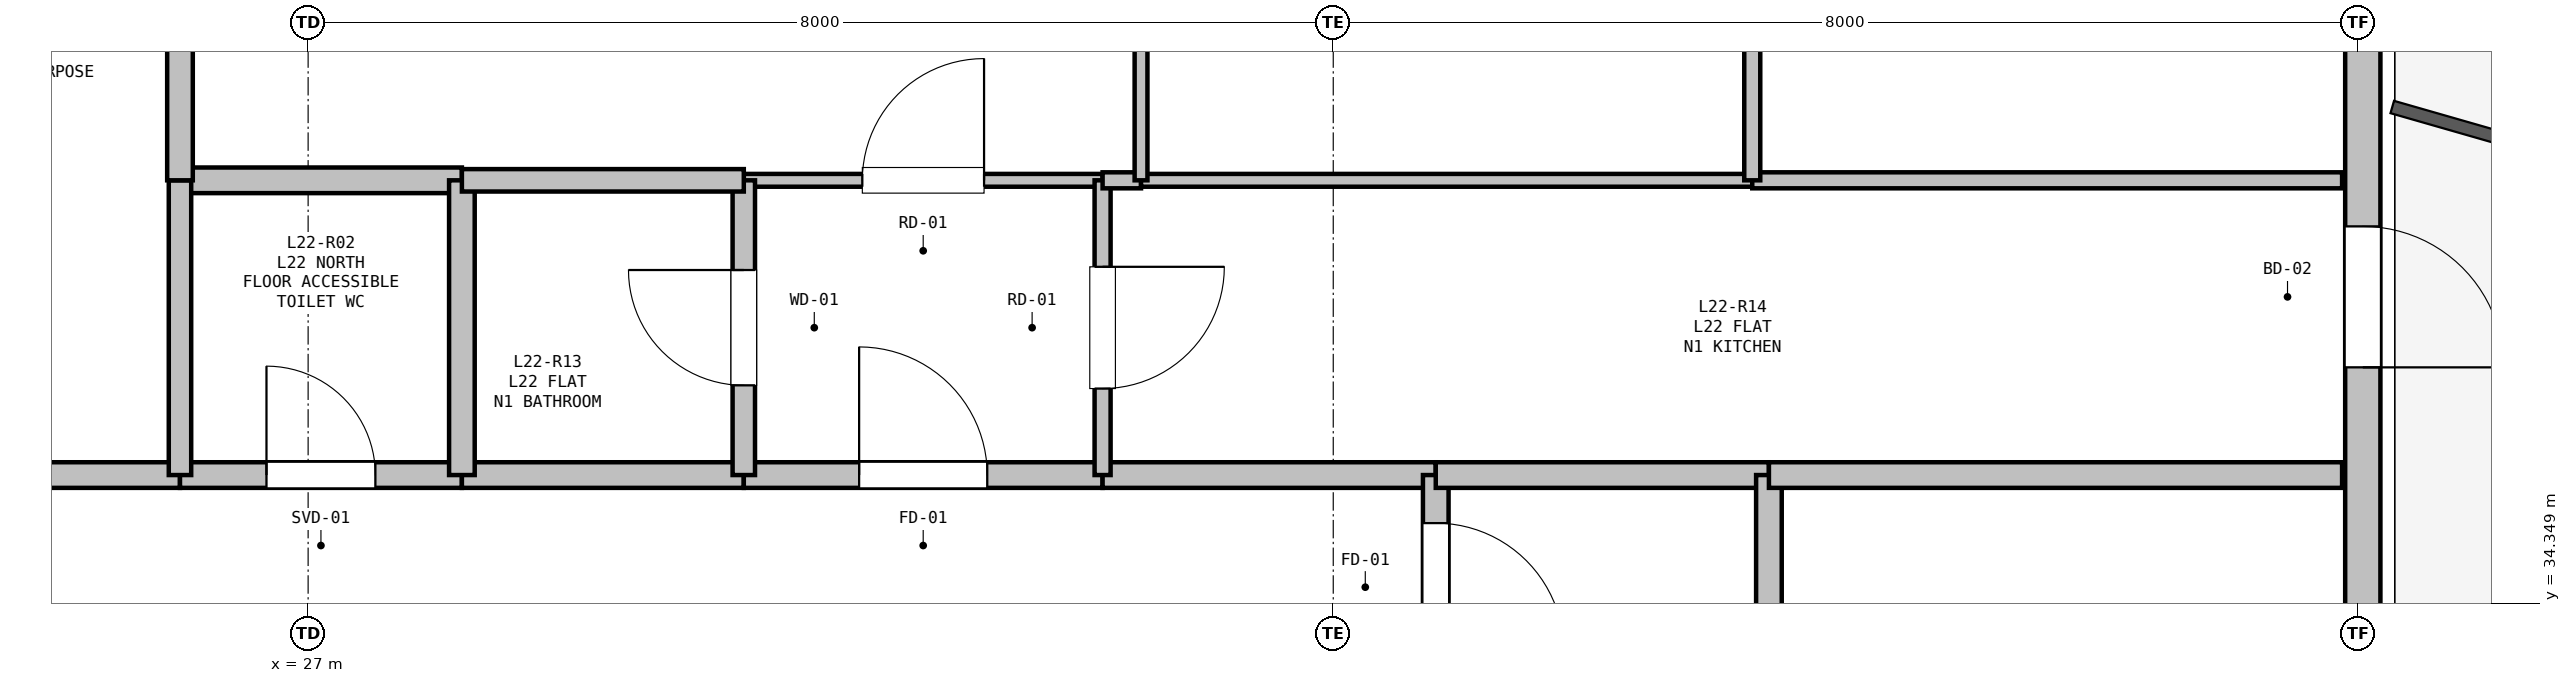
"""IFC4 building model, lengths in metres.
Left out: names, types, materials, properties, quantities, classifications, styles, units other than length and angle.
Written with IfcOpenShell. Run it as: python <this file> out.ifc"""

import sys

from ifc_helpers import new_model, si_unit, direction, frame, frame_2d, origin, place, context, subcontext, project, spatial, rectangle, extrude, element, fill, save


model = new_model("IFC4")
c1 = context("Model", 3, precision=1e-05, world=origin(), true_north=direction((0.0, 1.0)))
c2 = subcontext(c1, "Body", "Model", "MODEL_VIEW")
j1 = project(units=[si_unit("LENGTHUNIT", "METRE"), si_unit("PLANEANGLEUNIT", "RADIAN")], contexts=[c1])
p1 = place(None, origin())
s1 = spatial("IfcSite", under=j1, at=p1, CompositionType="ELEMENT")
p2 = place(p1, origin())
s2 = spatial("IfcBuilding", under=s1, at=p2, CompositionType="ELEMENT")
p3 = place(p2, frame((0.0, 0.0, 83.4)))
s3 = spatial("IfcBuildingStorey", under=s2, at=p3, CompositionType="ELEMENT", Elevation=83.4)
p4 = place(p3, frame((17.12, 36.097, 0.0), z_axis=(0.0, 0.0, 1.0), x_axis=(0.866027010039, 0.499997217876, 0.0)))
e1 = element("IfcWall", 1, at=p4, inside=s3, PredefinedType="PARAPET", context=c2, shape_type="SweptSolid", body=[
    extrude(rectangle(XDim=11.229, YDim=0.2, at=frame_2d((5.615, 0.0))), origin(), (0.0, 0.0, 1.0), 0.2),
])
p5 = place(p3, frame((43.035, 45.994, 0.0), z_axis=(0.0, 0.0, 1.0), x_axis=(0.0, -1.0, 0.0)))
e2 = element("IfcWall", 2, at=p5, inside=s3, PredefinedType="SOLIDWALL", context=c2, shape_type="SweptSolid", body=[
    extrude(rectangle(XDim=11.93, YDim=0.275, at=frame_2d((5.965, 0.0))), origin(), (0.0, 0.0, 1.0), 2.67),
])
p6 = place(p5, frame((8.704, 0.0, 0.0)))
e3 = element("IfcOpeningElement", 3, at=p6, cuts=e2, PredefinedType="OPENING", context=c2, shape_type="SweptSolid", body=[
    extrude(rectangle(XDim=1.1, YDim=2.1, at=frame_2d((0.55, 1.05))), frame((0.0, 0.147, 0.0), z_axis=(0.0, -1.0, 0.0), x_axis=(1.0, 0.0, 0.0)), (0.0, 0.0, 1.0), 0.295),
])
p7 = place(p3, frame((19.6, 35.35, 0.0), z_axis=(0.0, 0.0, 1.0), x_axis=(1.0, 0.0, 0.0)))
e4 = element("IfcWall", 4, at=p7, inside=s3, PredefinedType="PARTITIONING", context=c2, shape_type="SweptSolid", body=[
    extrude(rectangle(XDim=6.4, YDim=0.2, at=frame_2d((3.2, 0.0))), origin(), (0.0, 0.0, 1.0), 3.05),
])
p8 = place(p7, frame((2.966, 0.0, 0.0)))
e5 = element("IfcOpeningElement", 5, at=p8, cuts=e4, PredefinedType="OPENING", context=c2, shape_type="SweptSolid", body=[
    extrude(rectangle(XDim=1.8, YDim=2.2, at=frame_2d((0.9, 1.1))), frame((0.0, 0.11, 0.0), z_axis=(0.0, -1.0, 0.0), x_axis=(1.0, 0.0, 0.0)), (0.0, 0.0, 1.0), 0.22),
])
p9 = place(p3, frame((26.0, 35.35, 0.0), z_axis=(0.0, 0.0, 1.0), x_axis=(1.0, 0.0, 0.0)))
e6 = element("IfcWall", 6, at=p9, inside=s3, PredefinedType="PARTITIONING", context=c2, shape_type="SweptSolid", body=[
    extrude(rectangle(XDim=2.2, YDim=0.2, at=frame_2d((1.1, 0.0))), origin(), (0.0, 0.0, 1.0), 3.05),
])
p10 = place(p9, frame((0.675, 0.0, 0.0)))
e7 = element("IfcOpeningElement", 7, at=p10, cuts=e6, PredefinedType="OPENING", context=c2, shape_type="SweptSolid", body=[
    extrude(rectangle(XDim=0.85, YDim=2.1, at=frame_2d((0.425, 1.05))), frame((0.0, 0.11, 0.0), z_axis=(0.0, -1.0, 0.0), x_axis=(1.0, 0.0, 0.0)), (0.0, 0.0, 1.0), 0.22),
])
p11 = place(p3, frame((28.2, 35.35, 0.0), z_axis=(0.0, 0.0, 1.0), x_axis=(1.0, 0.0, 0.0)))
e8 = element("IfcWall", 8, at=p11, inside=s3, PredefinedType="PARTITIONING", context=c2, shape_type="SweptSolid", body=[
    extrude(rectangle(XDim=2.2, YDim=0.2, at=frame_2d((1.1, 0.0))), origin(), (0.0, 0.0, 1.0), 3.05),
])
p12 = place(p3, frame((30.4, 35.35, 0.0), z_axis=(0.0, 0.0, 1.0), x_axis=(1.0, 0.0, 0.0)))
e9 = element("IfcWall", 9, at=p12, inside=s3, PredefinedType="PARTITIONING", context=c2, shape_type="SweptSolid", body=[
    extrude(rectangle(XDim=2.8, YDim=0.2, at=frame_2d((1.4, 0.0))), origin(), (0.0, 0.0, 1.0), 3.05),
])
p13 = place(p12, frame((0.9, 0.0, 0.0)))
e10 = element("IfcOpeningElement", 10, at=p13, cuts=e9, PredefinedType="OPENING", context=c2, shape_type="SweptSolid", body=[
    extrude(rectangle(XDim=1.0, YDim=2.15, at=frame_2d((0.5, 1.075))), frame((0.0, 0.11, 0.0), z_axis=(0.0, -1.0, 0.0), x_axis=(1.0, 0.0, 0.0)), (0.0, 0.0, 1.0), 0.22),
])
p14 = place(p3, frame((33.2, 35.35, 0.0), z_axis=(0.0, 0.0, 1.0), x_axis=(1.0, 0.0, 0.0)))
e11 = element("IfcWall", 11, at=p14, inside=s3, PredefinedType="PARTITIONING", context=c2, shape_type="SweptSolid", body=[
    extrude(rectangle(XDim=2.6, YDim=0.2, at=frame_2d((1.3, 0.0))), origin(), (0.0, 0.0, 1.0), 3.05),
])
p15 = place(p3, frame((35.8, 35.35, 0.0), z_axis=(0.0, 0.0, 1.0), x_axis=(0.0, -1.0, 0.0)))
e12 = element("IfcWall", 12, at=p15, inside=s3, PredefinedType="PARTITIONING", context=c2, shape_type="SweptSolid", body=[
    extrude(rectangle(XDim=1.75, YDim=0.2, at=frame_2d((0.875, 0.0))), origin(), (0.0, 0.0, 1.0), 3.05),
])
p16 = place(p15, frame((0.375, 0.0, 0.0)))
e13 = element("IfcOpeningElement", 13, at=p16, cuts=e12, PredefinedType="OPENING", context=c2, shape_type="SweptSolid", body=[
    extrude(rectangle(XDim=1.0, YDim=2.15, at=frame_2d((0.5, 1.075))), frame((0.0, 0.11, 0.0), z_axis=(0.0, -1.0, 0.0), x_axis=(1.0, 0.0, 0.0)), (0.0, 0.0, 1.0), 0.22),
])
p17 = place(p3, frame((35.8, 35.35, 0.0), z_axis=(0.0, 0.0, 1.0), x_axis=(1.0, 0.0, 0.0)))
e14 = element("IfcWall", 14, at=p17, inside=s3, PredefinedType="PARTITIONING", context=c2, shape_type="SweptSolid", body=[
    extrude(rectangle(XDim=2.6, YDim=0.2, at=frame_2d((1.3, 0.0))), origin(), (0.0, 0.0, 1.0), 2.423),
])
p18 = place(p3, frame((38.4, 35.35, 0.0), z_axis=(0.0, 0.0, 1.0), x_axis=(0.0, -1.0, 0.0)))
e15 = element("IfcWall", 15, at=p18, inside=s3, PredefinedType="PARTITIONING", context=c2, shape_type="SweptSolid", body=[
    extrude(rectangle(XDim=6.85, YDim=0.2, at=frame_2d((3.425, 0.0))), origin(), (0.0, 0.0, 1.0), 3.05),
])
p19 = place(p18, frame((2.925, 0.0, 0.0)))
e16 = element("IfcOpeningElement", 16, at=p19, cuts=e15, PredefinedType="OPENING", context=c2, shape_type="SweptSolid", body=[
    extrude(rectangle(XDim=1.0, YDim=2.15, at=frame_2d((0.5, 1.075))), frame((0.0, 0.11, 0.0), z_axis=(0.0, -1.0, 0.0), x_axis=(1.0, 0.0, 0.0)), (0.0, 0.0, 1.0), 0.22),
])
p20 = place(p3, frame((30.4, 37.65, 0.0), z_axis=(0.0, 0.0, 1.0), x_axis=(1.0, 0.0, 0.0)))
e17 = element("IfcWall", 17, at=p20, inside=s3, PredefinedType="PARTITIONING", context=c2, shape_type="SweptSolid", body=[
    extrude(rectangle(XDim=2.8, YDim=0.1, at=frame_2d((1.4, 0.0))), origin(), (0.0, 0.0, 1.0), 3.05),
])
p21 = place(p20, frame((0.925, 0.0, 0.0)))
e18 = element("IfcOpeningElement", 18, at=p21, cuts=e17, PredefinedType="OPENING", context=c2, shape_type="SweptSolid", body=[
    extrude(rectangle(XDim=0.95, YDim=2.1, at=frame_2d((0.475, 1.05))), frame((0.0, 0.06, 0.0), z_axis=(0.0, -1.0, 0.0), x_axis=(1.0, 0.0, 0.0)), (0.0, 0.0, 1.0), 0.12),
])
p22 = place(p3, frame((33.2, 37.65, 0.0), z_axis=(0.0, 0.0, 1.0), x_axis=(0.0, -1.0, 0.0)))
e19 = element("IfcWall", 19, at=p22, inside=s3, PredefinedType="PARTITIONING", context=c2, shape_type="SweptSolid", body=[
    extrude(rectangle(XDim=2.3, YDim=0.125, at=frame_2d((1.15, 0.0))), origin(), (0.0, 0.0, 1.0), 3.05),
])
p23 = place(p22, frame((0.675, 0.0, 0.0)))
e20 = element("IfcOpeningElement", 20, at=p23, cuts=e19, PredefinedType="OPENING", context=c2, shape_type="SweptSolid", body=[
    extrude(rectangle(XDim=0.95, YDim=2.1, at=frame_2d((0.475, 1.05))), frame((0.0, 0.073, 0.0), z_axis=(0.0, -1.0, 0.0), x_axis=(1.0, 0.0, 0.0)), (0.0, 0.0, 1.0), 0.145),
])
p24 = place(p3, frame((30.4, 35.35, 0.0), z_axis=(0.0, 0.0, 1.0), x_axis=(0.0, 1.0, 0.0)))
e21 = element("IfcWall", 21, at=p24, inside=s3, PredefinedType="PLUMBINGWALL", context=c2, shape_type="SweptSolid", body=[
    extrude(rectangle(XDim=2.3, YDim=0.175, at=frame_2d((1.15, 0.0))), origin(), (0.0, 0.0, 1.0), 3.05),
])
p25 = place(p24, frame((0.7, 0.0, 0.0)))
e22 = element("IfcOpeningElement", 22, at=p25, cuts=e21, PredefinedType="OPENING", context=c2, shape_type="SweptSolid", body=[
    extrude(rectangle(XDim=0.9, YDim=2.1, at=frame_2d((0.45, 1.05))), frame((0.0, 0.097, 0.0), z_axis=(0.0, -1.0, 0.0), x_axis=(1.0, 0.0, 0.0)), (0.0, 0.0, 1.0), 0.195),
])
p26 = place(p3, frame((26.0, 37.65, 0.0), z_axis=(0.0, 0.0, 1.0), x_axis=(1.0, 0.0, 0.0)))
e23 = element("IfcWall", 23, at=p26, inside=s3, PredefinedType="PARTITIONING", context=c2, shape_type="SweptSolid", body=[
    extrude(rectangle(XDim=2.2, YDim=0.2, at=frame_2d((1.1, 0.0))), origin(), (0.0, 0.0, 1.0), 3.05),
])
p27 = place(p3, frame((28.2, 37.65, 0.0), z_axis=(0.0, 0.0, 1.0), x_axis=(0.0, -1.0, 0.0)))
e24 = element("IfcWall", 24, at=p27, inside=s3, PredefinedType="PARTITIONING", context=c2, shape_type="SweptSolid", body=[
    extrude(rectangle(XDim=2.3, YDim=0.2, at=frame_2d((1.15, 0.0))), origin(), (0.0, 0.0, 1.0), 3.05),
])
p28 = place(p3, frame((26.0, 35.35, 0.0), z_axis=(0.0, 0.0, 1.0), x_axis=(0.0, 1.0, 0.0)))
e25 = element("IfcWall", 25, at=p28, inside=s3, PredefinedType="PLUMBINGWALL", context=c2, shape_type="SweptSolid", body=[
    extrude(rectangle(XDim=2.3, YDim=0.175, at=frame_2d((1.15, 0.0))), origin(), (0.0, 0.0, 1.0), 3.05),
])
p29 = place(p3, frame((28.2, 37.65, 0.0), z_axis=(0.0, 0.0, 1.0), x_axis=(1.0, 0.0, 0.0)))
e26 = element("IfcWall", 26, at=p29, inside=s3, PredefinedType="PLUMBINGWALL", context=c2, shape_type="SweptSolid", body=[
    extrude(rectangle(XDim=2.2, YDim=0.175, at=frame_2d((1.1, 0.0))), origin(), (0.0, 0.0, 1.0), 3.05),
])
p30 = place(p3, frame((42.873, 35.35, 0.0), z_axis=(0.0, 0.0, 1.0), x_axis=(-1.0, 0.0, 0.0)))
e27 = element("IfcWall", 27, at=p30, inside=s3, PredefinedType="PARTITIONING", context=c2, shape_type="SweptSolid", body=[
    extrude(rectangle(XDim=4.473, YDim=0.2, at=frame_2d((2.237, 0.0))), origin(), (0.0, 0.0, 1.0), 2.365),
])
p31 = place(p3, frame((33.2, 37.65, 0.0), z_axis=(0.0, 0.0, 1.0), x_axis=(1.0, 0.0, 0.0)))
e28 = element("IfcWall", 28, at=p31, inside=s3, PredefinedType="PARTITIONING", context=c2, shape_type="SweptSolid", body=[
    extrude(rectangle(XDim=0.3, YDim=0.125, at=frame_2d((0.15, 0.0))), origin(), (0.0, 0.0, 1.0), 3.05),
])
p32 = place(p3, frame((33.5, 37.65, 0.0), z_axis=(0.0, 0.0, 1.0), x_axis=(1.0, 0.0, 0.0)))
e29 = element("IfcWall", 29, at=p32, inside=s3, PredefinedType="PARTITIONING", context=c2, shape_type="SweptSolid", body=[
    extrude(rectangle(XDim=4.77, YDim=0.1, at=frame_2d((2.385, 0.0))), origin(), (0.0, 0.0, 1.0), 2.423),
])
p33 = place(p3, frame((38.27, 37.65, 0.0), z_axis=(0.0, 0.0, 1.0), x_axis=(1.0, 0.0, 0.0)))
e30 = element("IfcWall", 30, at=p33, inside=s3, PredefinedType="PARTITIONING", context=c2, shape_type="SweptSolid", body=[
    extrude(rectangle(XDim=4.603, YDim=0.125, at=frame_2d((2.302, 0.0))), origin(), (0.0, 0.0, 1.0), 2.365),
])
p34 = place(p3, frame((26.0, 41.182, 0.0), z_axis=(0.0, 0.0, 1.0), x_axis=(0.0, -1.0, 0.0)))
e31 = element("IfcWall", 31, at=p34, inside=s3, PredefinedType="PARTITIONING", context=c2, shape_type="SweptSolid", body=[
    extrude(rectangle(XDim=3.532, YDim=0.2, at=frame_2d((1.766, 0.0))), origin(), (0.0, 0.0, 1.0), 2.365),
])
p35 = place(p3, frame((33.5, 43.13, 0.0), z_axis=(0.0, 0.0, 1.0), x_axis=(0.0, -1.0, 0.0)))
e32 = element("IfcWall", 32, at=p35, inside=s3, PredefinedType="PARTITIONING", context=c2, shape_type="SweptSolid", body=[
    extrude(rectangle(XDim=5.48, YDim=0.1, at=frame_2d((2.74, 0.0))), origin(), (0.0, 0.0, 1.0), 3.05),
])
p36 = place(p35, frame((2.265, 0.0, 0.0)))
e33 = element("IfcOpeningElement", 33, at=p36, cuts=e32, PredefinedType="OPENING", context=c2, shape_type="SweptSolid", body=[
    extrude(rectangle(XDim=0.95, YDim=2.1, at=frame_2d((0.475, 1.05))), frame((0.0, 0.06, 0.0), z_axis=(0.0, -1.0, 0.0), x_axis=(1.0, 0.0, 0.0)), (0.0, 0.0, 1.0), 0.12),
])
p37 = place(p3, frame((38.27, 43.13, 0.0), z_axis=(0.0, 0.0, 1.0), x_axis=(0.0, -1.0, 0.0)))
e34 = element("IfcWall", 34, at=p37, inside=s3, PredefinedType="PARTITIONING", context=c2, shape_type="SweptSolid", body=[
    extrude(rectangle(XDim=5.48, YDim=0.125, at=frame_2d((2.74, 0.0))), origin(), (0.0, 0.0, 1.0), 3.05),
])
p38 = place(p37, frame((2.265, 0.0, 0.0)))
e35 = element("IfcOpeningElement", 35, at=p38, cuts=e34, PredefinedType="OPENING", context=c2, shape_type="SweptSolid", body=[
    extrude(rectangle(XDim=0.95, YDim=2.1, at=frame_2d((0.475, 1.05))), frame((0.0, 0.073, 0.0), z_axis=(0.0, -1.0, 0.0), x_axis=(1.0, 0.0, 0.0)), (0.0, 0.0, 1.0), 0.145),
])
p39 = place(p6, origin())
e36 = element("IfcDoor", 36, at=p39, inside=s3, OperationType="SINGLE_SWING_RIGHT", PredefinedType="DOOR", context=c2, shape_type="SweptSolid", body=[
    extrude(rectangle(XDim=1.1, YDim=2.1, at=frame_2d((0.55, 1.05))), frame((0.0, 0.025, 0.0), z_axis=(0.0, -1.0, 0.0), x_axis=(1.0, 0.0, 0.0)), (0.0, 0.0, 1.0), 0.05),
])
fill(e3, e36)
p40 = place(p16, origin())
e37 = element("IfcDoor", 37, at=p40, inside=s3, OperationType="SINGLE_SWING_RIGHT", PredefinedType="DOOR", context=c2, shape_type="SweptSolid", body=[
    extrude(rectangle(XDim=1.0, YDim=2.15, at=frame_2d((0.5, 1.075))), frame((0.0, 0.025, 0.0), z_axis=(0.0, -1.0, 0.0), x_axis=(1.0, 0.0, 0.0)), (0.0, 0.0, 1.0), 0.05),
])
fill(e13, e37)
p41 = place(p13, origin())
e38 = element("IfcDoor", 38, at=p41, inside=s3, OperationType="SINGLE_SWING_LEFT", PredefinedType="DOOR", context=c2, shape_type="SweptSolid", body=[
    extrude(rectangle(XDim=1.0, YDim=2.15, at=frame_2d((0.5, 1.075))), frame((0.0, 0.025, 0.0), z_axis=(0.0, -1.0, 0.0), x_axis=(1.0, 0.0, 0.0)), (0.0, 0.0, 1.0), 0.05),
])
fill(e10, e38)
p42 = place(p10, origin())
e39 = element("IfcDoor", 39, at=p42, inside=s3, OperationType="SINGLE_SWING_LEFT", PredefinedType="DOOR", context=c2, shape_type="SweptSolid", body=[
    extrude(rectangle(XDim=0.85, YDim=2.1, at=frame_2d((0.425, 1.05))), frame((0.0, 0.025, 0.0), z_axis=(0.0, -1.0, 0.0), x_axis=(1.0, 0.0, 0.0)), (0.0, 0.0, 1.0), 0.05),
])
fill(e7, e39)
p43 = place(p25, origin())
e40 = element("IfcDoor", 40, at=p43, inside=s3, OperationType="SINGLE_SWING_RIGHT", PredefinedType="DOOR", context=c2, shape_type="SweptSolid", body=[
    extrude(rectangle(XDim=0.9, YDim=2.1, at=frame_2d((0.45, 1.05))), frame((0.0, 0.025, 0.0), z_axis=(0.0, -1.0, 0.0), x_axis=(1.0, 0.0, 0.0)), (0.0, 0.0, 1.0), 0.05),
])
fill(e22, e40)
p44 = place(p23, origin())
e41 = element("IfcDoor", 41, at=p44, inside=s3, OperationType="SINGLE_SWING_LEFT", PredefinedType="DOOR", context=c2, shape_type="SweptSolid", body=[
    extrude(rectangle(XDim=0.95, YDim=2.1, at=frame_2d((0.475, 1.05))), frame((0.0, 0.025, 0.0), z_axis=(0.0, -1.0, 0.0), x_axis=(1.0, 0.0, 0.0)), (0.0, 0.0, 1.0), 0.05),
])
fill(e20, e41)
p45 = place(p21, origin())
e42 = element("IfcDoor", 42, at=p45, inside=s3, OperationType="SINGLE_SWING_RIGHT", PredefinedType="DOOR", context=c2, shape_type="SweptSolid", body=[
    extrude(rectangle(XDim=0.95, YDim=2.1, at=frame_2d((0.475, 1.05))), frame((0.0, 0.025, 0.0), z_axis=(0.0, -1.0, 0.0), x_axis=(1.0, 0.0, 0.0)), (0.0, 0.0, 1.0), 0.05),
])
fill(e18, e42)
save(model, sys.argv[1])
